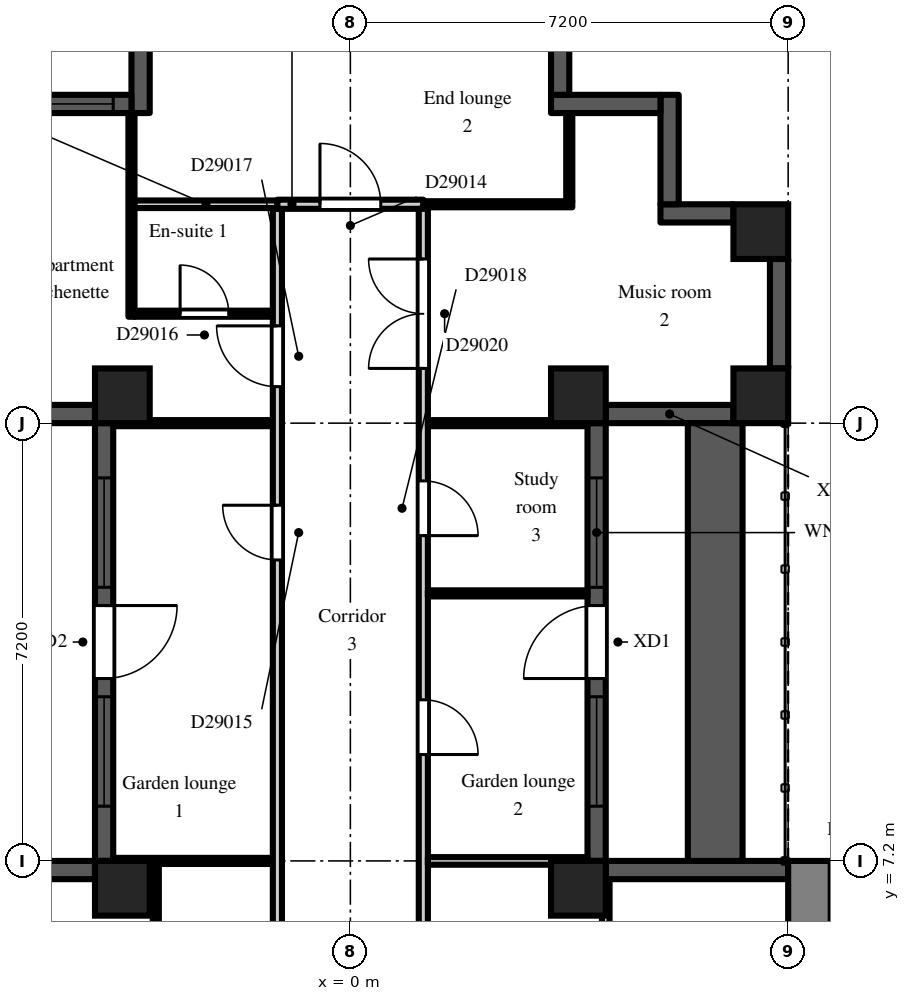
"""IFC4 building model, lengths in metres.
Left out: names, types, materials, properties, quantities, classifications, styles, units other than length and angle.
Written with IfcOpenShell. Run it as: python <this file> out.ifc"""

import sys

from ifc_helpers import new_model, si_unit, direction, frame, frame_2d, origin, origin_2d, place, context, subcontext, project, spatial, rectangle, extrude, element, fill, save


model = new_model("IFC4")
c1 = context("Model", 3, precision=1e-05, world=origin(), true_north=direction((0.0, 1.0)))
c2 = subcontext(c1, "Body", "Model", "MODEL_VIEW")
j1 = project(units=[si_unit("LENGTHUNIT", "METRE"), si_unit("PLANEANGLEUNIT", "RADIAN")], contexts=[c1])
p1 = place(None, origin())
s1 = spatial("IfcSite", under=j1, at=p1, CompositionType="ELEMENT")
p2 = place(p1, origin())
s2 = spatial("IfcBuilding", under=s1, at=p2, CompositionType="ELEMENT")
p3 = place(p2, frame((0.0, 0.0, 198.9)))
s3 = spatial("IfcBuildingStorey", under=s2, at=p3, CompositionType="ELEMENT", Elevation=198.9)
for number, where, z_axis, x_axis in (
    (1, (-3.75, 6.75, 0.0), (0.0, 0.0, 1.0), (1.0, 0.0, 0.0)),
    (2, (-3.75, 14.85, 0.0), (0.0, 0.0, 1.0), (1.0, 0.0, 0.0)),
    (3, (3.75, 6.75, 0.0), (0.0, 0.0, 1.0), (1.0, 0.0, 0.0)),
    (4, (3.75, 14.85, 0.0), (0.0, 0.0, 1.0), (1.0, 0.0, 0.0)),
    (5, (6.75, 14.85, 0.0), (0.0, 0.0, 1.0), (1.0, 0.0, 0.0)),
    (6, (6.75, 17.55, 0.0), (0.0, 0.0, 1.0), (1.0, 0.0, 0.0)),
):
    element("IfcColumn", number, at=place(p3, frame(where, z_axis=z_axis, x_axis=x_axis)), inside=s3, PredefinedType="COLUMN", context=c2, shape_type="SweptSolid", body=[
        extrude(rectangle(XDim=0.9, YDim=0.9, at=origin_2d()), origin(), (0.0, 0.0, 1.0), 3.0),
    ])
p4 = place(p3, frame((7.2, 7.05, 0.0), z_axis=(0.0, 0.0, 1.0), x_axis=(-1.0, 0.0, 0.0)))
e7 = element("IfcWall", 7, at=p4, inside=s3, PredefinedType="SOLIDWALL", context=c2, shape_type="SweptSolid", body=[
    extrude(rectangle(XDim=3.0, YDim=0.3, at=frame_2d((1.5, 0.0))), origin(), (0.0, 0.0, 1.0), 2.3),
])
p5 = place(p3, frame((4.05, 7.2, 0.0), z_axis=(0.0, 0.0, 1.0), x_axis=(0.0, 1.0, 0.0)))
e8 = element("IfcWall", 8, at=p5, inside=s3, PredefinedType="SOLIDWALL", context=c2, shape_type="SweptSolid", body=[
    extrude(rectangle(XDim=7.2, YDim=0.3, at=frame_2d((3.6, 0.0))), origin(), (0.0, 0.0, 1.0), 2.3),
])
p6 = place(p5, frame((3.0, 0.0, 0.0)))
e9 = element("IfcOpeningElement", 9, at=p6, cuts=e8, PredefinedType="OPENING", context=c2, shape_type="SweptSolid", body=[
    extrude(rectangle(XDim=1.2, YDim=2.05, at=frame_2d((0.6, 1.025))), frame((0.0, 0.16, 0.0), z_axis=(0.0, -1.0, 0.0), x_axis=(1.0, 0.0, 0.0)), (0.0, 0.0, 1.0), 0.32),
])
p7 = place(p5, frame((0.9, 0.0, 0.2)))
e10 = element("IfcOpeningElement", 10, at=p7, cuts=e8, PredefinedType="OPENING", context=c2, shape_type="SweptSolid", body=[
    extrude(rectangle(XDim=1.8, YDim=1.85, at=frame_2d((0.9, 0.925))), frame((0.0, 0.16, 0.0), z_axis=(0.0, -1.0, 0.0), x_axis=(1.0, 0.0, 0.0)), (0.0, 0.0, 1.0), 0.32),
])
p8 = place(p5, frame((4.5, 0.0, 0.2)))
e11 = element("IfcOpeningElement", 11, at=p8, cuts=e8, PredefinedType="OPENING", context=c2, shape_type="SweptSolid", body=[
    extrude(rectangle(XDim=1.8, YDim=1.85, at=frame_2d((0.9, 0.925))), frame((0.0, 0.16, 0.0), z_axis=(0.0, -1.0, 0.0), x_axis=(1.0, 0.0, 0.0)), (0.0, 0.0, 1.0), 0.32),
])
p9 = place(p3, frame((4.2, 14.55, 0.0), z_axis=(0.0, 0.0, 1.0), x_axis=(1.0, 0.0, 0.0)))
e12 = element("IfcWall", 12, at=p9, inside=s3, PredefinedType="SOLIDWALL", context=c2, shape_type="SweptSolid", body=[
    extrude(rectangle(XDim=2.1, YDim=0.3, at=frame_2d((1.05, 0.0))), origin(), (0.0, 0.0, 1.0), 2.3),
])
p10 = place(p3, frame((7.05, 15.3, 0.0), z_axis=(0.0, 0.0, 1.0), x_axis=(0.0, 1.0, 0.0)))
e13 = element("IfcWall", 13, at=p10, inside=s3, PredefinedType="SOLIDWALL", context=c2, shape_type="SweptSolid", body=[
    extrude(rectangle(XDim=1.8, YDim=0.3, at=frame_2d((0.9, 0.0))), origin(), (0.0, 0.0, 1.0), 2.3),
])
p11 = place(p3, frame((6.3, 17.85, 0.0), z_axis=(0.0, 0.0, 1.0), x_axis=(-1.0, 0.0, 0.0)))
e14 = element("IfcWall", 14, at=p11, inside=s3, PredefinedType="SOLIDWALL", context=c2, shape_type="SweptSolid", body=[
    extrude(rectangle(XDim=1.2, YDim=0.3, at=frame_2d((0.6, 0.0))), origin(), (0.0, 0.0, 1.0), 2.6),
])
for number, where, z_axis, x_axis in (
    (15, (5.25, 18.0, 0.0), (0.0, 0.0, 1.0), (0.0, 1.0, 0.0)),
    (16, (5.1, 19.65, 0.0), (0.0, 0.0, 1.0), (-1.0, 0.0, 0.0)),
):
    element("IfcWall", number, at=place(p3, frame(where, z_axis=z_axis, x_axis=x_axis)), inside=s3, PredefinedType="SOLIDWALL", context=c2, shape_type="SweptSolid", body=[
        extrude(rectangle(XDim=1.8, YDim=0.3, at=frame_2d((0.9, 0.0))), origin(), (0.0, 0.0, 1.0), 2.6),
    ])
p12 = place(p3, frame((3.45, 19.8, 0.0), z_axis=(0.0, 0.0, 1.0), x_axis=(0.0, 1.0, 0.0)))
e17 = element("IfcWall", 17, at=p12, inside=s3, PredefinedType="SOLIDWALL", context=c2, shape_type="SweptSolid", body=[
    extrude(rectangle(XDim=0.9, YDim=0.3, at=frame_2d((0.45, 0.0))), origin(), (0.0, 0.0, 1.0), 2.6),
])
p13 = place(p3, frame((-3.45, 20.7, 0.0), z_axis=(0.0, 0.0, 1.0), x_axis=(0.0, -1.0, 0.0)))
e18 = element("IfcWall", 18, at=p13, inside=s3, PredefinedType="SOLIDWALL", context=c2, shape_type="SweptSolid", body=[
    extrude(rectangle(XDim=1.2, YDim=0.3, at=frame_2d((0.6, 0.0))), origin(), (0.0, 0.0, 1.0), 2.6),
])
p14 = place(p3, frame((-3.6, 19.65, 0.0), z_axis=(0.0, 0.0, 1.0), x_axis=(-1.0, 0.0, 0.0)))
e19 = element("IfcWall", 19, at=p14, inside=s3, PredefinedType="SOLIDWALL", context=c2, shape_type="SweptSolid", body=[
    extrude(rectangle(XDim=1.8, YDim=0.3, at=frame_2d((0.9, 0.0))), origin(), (0.0, 0.0, 1.0), 2.6),
])
p15 = place(p14, frame((0.3, 0.0, 0.2)))
e20 = element("IfcOpeningElement", 20, at=p15, cuts=e19, PredefinedType="OPENING", context=c2, shape_type="SweptSolid", body=[
    extrude(rectangle(XDim=1.2, YDim=1.85, at=frame_2d((0.6, 0.925))), frame((0.0, 0.16, 0.0), z_axis=(0.0, -1.0, 0.0), x_axis=(1.0, 0.0, 0.0)), (0.0, 0.0, 1.0), 0.32),
])
p16 = place(p3, frame((-6.3, 14.55, 0.0), z_axis=(0.0, 0.0, 1.0), x_axis=(1.0, 0.0, 0.0)))
e21 = element("IfcWall", 21, at=p16, inside=s3, PredefinedType="SOLIDWALL", context=c2, shape_type="SweptSolid", body=[
    extrude(rectangle(XDim=2.1, YDim=0.3, at=frame_2d((1.05, 0.0))), origin(), (0.0, 0.0, 1.0), 2.3),
])
p17 = place(p3, frame((-4.05, 14.4, 0.0), z_axis=(0.0, 0.0, 1.0), x_axis=(0.0, -1.0, 0.0)))
e22 = element("IfcWall", 22, at=p17, inside=s3, PredefinedType="SOLIDWALL", context=c2, shape_type="SweptSolid", body=[
    extrude(rectangle(XDim=7.2, YDim=0.3, at=frame_2d((3.6, 0.0))), origin(), (0.0, 0.0, 1.0), 2.3),
])
p18 = place(p17, frame((3.0, 0.0, 0.0)))
e23 = element("IfcOpeningElement", 23, at=p18, cuts=e22, PredefinedType="OPENING", context=c2, shape_type="SweptSolid", body=[
    extrude(rectangle(XDim=1.2, YDim=2.05, at=frame_2d((0.6, 1.025))), frame((0.0, 0.16, 0.0), z_axis=(0.0, -1.0, 0.0), x_axis=(1.0, 0.0, 0.0)), (0.0, 0.0, 1.0), 0.32),
])
p19 = place(p17, frame((0.9, 0.0, 0.2)))
e24 = element("IfcOpeningElement", 24, at=p19, cuts=e22, PredefinedType="OPENING", context=c2, shape_type="SweptSolid", body=[
    extrude(rectangle(XDim=1.8, YDim=1.85, at=frame_2d((0.9, 0.925))), frame((0.0, 0.16, 0.0), z_axis=(0.0, -1.0, 0.0), x_axis=(1.0, 0.0, 0.0)), (0.0, 0.0, 1.0), 0.32),
])
p20 = place(p17, frame((4.5, 0.0, 0.2)))
e25 = element("IfcOpeningElement", 25, at=p20, cuts=e22, PredefinedType="OPENING", context=c2, shape_type="SweptSolid", body=[
    extrude(rectangle(XDim=1.8, YDim=1.85, at=frame_2d((0.9, 0.925))), frame((0.0, 0.16, 0.0), z_axis=(0.0, -1.0, 0.0), x_axis=(1.0, 0.0, 0.0)), (0.0, 0.0, 1.0), 0.32),
])
p21 = place(p3, frame((-4.2, 7.05, 0.0), z_axis=(0.0, 0.0, 1.0), x_axis=(-1.0, 0.0, 0.0)))
e26 = element("IfcWall", 26, at=p21, inside=s3, PredefinedType="SOLIDWALL", context=c2, shape_type="SweptSolid", body=[
    extrude(rectangle(XDim=3.0, YDim=0.3, at=frame_2d((1.5, 0.0))), origin(), (0.0, 0.0, 1.0), 2.3),
])
p22 = place(p3, frame((6.0, 7.2, 0.0), z_axis=(0.0, 0.0, 1.0), x_axis=(0.0, 1.0, 0.0)))
e27 = element("IfcWall", 27, at=p22, inside=s3, PredefinedType="PARAPET", context=c2, shape_type="SweptSolid", body=[
    extrude(rectangle(XDim=7.2, YDim=0.9, at=frame_2d((3.6, 0.0))), origin(), (0.0, 0.0, 1.0), 0.8),
])
p23 = place(p3, frame((7.55, -7.2, 0.0), z_axis=(0.0, 0.0, 1.0), x_axis=(0.0, 1.0, 0.0)))
e28 = element("IfcWall", 28, at=p23, inside=s3, PredefinedType="SHEAR", context=c2, shape_type="SweptSolid", body=[
    extrude(rectangle(XDim=14.4, YDim=0.7, at=frame_2d((7.2, 0.0))), origin(), (0.0, 0.0, 1.0), 2.6),
])
p24 = place(p23, frame((6.0, 0.0, 0.0)))
e29 = element("IfcOpeningElement", 29, at=p24, cuts=e28, PredefinedType="OPENING", context=c2, shape_type="SweptSolid", body=[
    extrude(rectangle(XDim=2.4, YDim=2.2, at=frame_2d((1.2, 1.1))), frame((0.0, 0.36, 0.0), z_axis=(0.0, -1.0, 0.0), x_axis=(1.0, 0.0, 0.0)), (0.0, 0.0, 1.0), 0.72),
])
for number, where, z_axis, x_axis in (
    (30, (-3.9, 7.2, 0.0), (0.0, 0.0, 1.0), (1.0, 0.0, 0.0)),
    (31, (-3.9, 14.4, 0.0), (0.0, 0.0, 1.0), (1.0, 0.0, 0.0)),
):
    element("IfcWall", number, at=place(p3, frame(where, z_axis=z_axis, x_axis=x_axis)), inside=s3, PredefinedType="PARTITIONING", context=c2, shape_type="SweptSolid", body=[
        extrude(rectangle(XDim=2.625, YDim=0.1, at=frame_2d((1.312, 0.0))), origin(), (0.0, 0.0, 1.0), 2.6),
    ])
p25 = place(p3, frame((-3.6, 16.15, 0.0), z_axis=(0.0, 0.0, 1.0), x_axis=(0.0, 1.0, 0.0)))
e32 = element("IfcWall", 32, at=p25, inside=s3, PredefinedType="PARTITIONING", context=c2, shape_type="SweptSolid", body=[
    extrude(rectangle(XDim=3.35, YDim=0.1, at=frame_2d((1.675, 0.0))), origin(), (0.0, 0.0, 1.0), 2.6),
])
p26 = place(p3, frame((-3.55, 16.2, 0.0), z_axis=(0.0, 0.0, 1.0), x_axis=(1.0, 0.0, 0.0)))
e33 = element("IfcWall", 33, at=p26, inside=s3, PredefinedType="PARTITIONING", context=c2, shape_type="SweptSolid", body=[
    extrude(rectangle(XDim=2.275, YDim=0.1, at=frame_2d((1.138, 0.0))), origin(), (0.0, 0.0, 1.0), 2.6),
])
p27 = place(p26, frame((0.75, 0.0, 0.0)))
e34 = element("IfcOpeningElement", 34, at=p27, cuts=e33, PredefinedType="OPENING", context=c2, shape_type="SweptSolid", body=[
    extrude(rectangle(XDim=0.8, YDim=2.1, at=frame_2d((0.4, 1.05))), frame((0.0, 0.06, 0.0), z_axis=(0.0, -1.0, 0.0), x_axis=(1.0, 0.0, 0.0)), (0.0, 0.0, 1.0), 0.12),
])
p28 = place(p3, frame((-3.55, 18.0, 0.0), z_axis=(0.0, 0.0, 1.0), x_axis=(1.0, 0.0, 0.0)))
e35 = element("IfcWall", 35, at=p28, inside=s3, PredefinedType="PARTITIONING", context=c2, shape_type="SweptSolid", body=[
    extrude(rectangle(XDim=2.35, YDim=0.125, at=frame_2d((1.175, 0.0))), origin(), (0.0, 0.0, 1.0), 2.6),
])
p29 = place(p3, frame((-3.2, 1.275, 0.0), z_axis=(0.0, 0.0, 1.0), x_axis=(0.0, 1.0, 0.0)))
e36 = element("IfcWall", 36, at=p29, inside=s3, PredefinedType="PARTITIONING", context=c2, shape_type="SweptSolid", body=[
    extrude(rectangle(XDim=5.875, YDim=0.1, at=frame_2d((2.938, 0.0))), origin(), (0.0, 0.0, 1.0), 2.6),
])
p30 = place(p3, frame((-1.2, 1.275, 0.0), z_axis=(0.0, 0.0, 1.0), x_axis=(0.0, 1.0, 0.0)))
e37 = element("IfcWall", 37, at=p30, inside=s3, PredefinedType="PARTITIONING", context=c2, shape_type="SweptSolid", body=[
    extrude(rectangle(XDim=16.65, YDim=0.15, at=frame_2d((8.325, 0.0))), origin(), (0.0, 0.0, 1.0), 2.6),
])
p31 = place(p30, frame((2.475, 0.0, 0.0)))
e38 = element("IfcOpeningElement", 38, at=p31, cuts=e37, PredefinedType="OPENING", context=c2, shape_type="SweptSolid", body=[
    extrude(rectangle(XDim=0.9, YDim=2.1, at=frame_2d((0.45, 1.05))), frame((0.0, 0.085, 0.0), z_axis=(0.0, -1.0, 0.0), x_axis=(1.0, 0.0, 0.0)), (0.0, 0.0, 1.0), 0.17),
])
p32 = place(p30, frame((10.875, 0.0, 0.0)))
e39 = element("IfcOpeningElement", 39, at=p32, cuts=e37, PredefinedType="OPENING", context=c2, shape_type="SweptSolid", body=[
    extrude(rectangle(XDim=0.9, YDim=2.1, at=frame_2d((0.45, 1.05))), frame((0.0, 0.085, 0.0), z_axis=(0.0, -1.0, 0.0), x_axis=(1.0, 0.0, 0.0)), (0.0, 0.0, 1.0), 0.17),
])
p33 = place(p30, frame((13.725, 0.0, 0.0)))
e40 = element("IfcOpeningElement", 40, at=p33, cuts=e37, PredefinedType="OPENING", context=c2, shape_type="SweptSolid", body=[
    extrude(rectangle(XDim=1.0, YDim=2.1, at=frame_2d((0.5, 1.05))), frame((0.0, 0.085, 0.0), z_axis=(0.0, -1.0, 0.0), x_axis=(1.0, 0.0, 0.0)), (0.0, 0.0, 1.0), 0.17),
])
p34 = place(p3, frame((-1.2, 18.0, 0.0), z_axis=(0.0, 0.0, 1.0), x_axis=(1.0, 0.0, 0.0)))
e41 = element("IfcWall", 41, at=p34, inside=s3, PredefinedType="PARTITIONING", context=c2, shape_type="SweptSolid", body=[
    extrude(rectangle(XDim=2.4, YDim=0.15, at=frame_2d((1.2, 0.0))), origin(), (0.0, 0.0, 1.0), 2.6),
])
p35 = place(p34, frame((0.7, 0.0, 0.0)))
e42 = element("IfcOpeningElement", 42, at=p35, cuts=e41, PredefinedType="OPENING", context=c2, shape_type="SweptSolid", body=[
    extrude(rectangle(XDim=1.0, YDim=2.1, at=frame_2d((0.5, 1.05))), frame((0.0, 0.085, 0.0), z_axis=(0.0, -1.0, 0.0), x_axis=(1.0, 0.0, 0.0)), (0.0, 0.0, 1.0), 0.17),
])
p36 = place(p3, frame((1.2, 1.125, 0.0), z_axis=(0.0, 0.0, 1.0), x_axis=(0.0, 1.0, 0.0)))
e43 = element("IfcWall", 43, at=p36, inside=s3, PredefinedType="PARTITIONING", context=c2, shape_type="SweptSolid", body=[
    extrude(rectangle(XDim=16.8, YDim=0.15, at=frame_2d((8.4, 0.0))), origin(), (0.0, 0.0, 1.0), 2.6),
])
p37 = place(p36, frame((2.625, 0.0, 0.0)))
e44 = element("IfcOpeningElement", 44, at=p37, cuts=e43, PredefinedType="OPENING", context=c2, shape_type="SweptSolid", body=[
    extrude(rectangle(XDim=0.9, YDim=2.1, at=frame_2d((0.45, 1.05))), frame((0.0, 0.085, 0.0), z_axis=(0.0, -1.0, 0.0), x_axis=(1.0, 0.0, 0.0)), (0.0, 0.0, 1.0), 0.17),
])
p38 = place(p36, frame((11.425, 0.0, 0.0)))
e45 = element("IfcOpeningElement", 45, at=p38, cuts=e43, PredefinedType="OPENING", context=c2, shape_type="SweptSolid", body=[
    extrude(rectangle(XDim=0.9, YDim=2.1, at=frame_2d((0.45, 1.05))), frame((0.0, 0.085, 0.0), z_axis=(0.0, -1.0, 0.0), x_axis=(1.0, 0.0, 0.0)), (0.0, 0.0, 1.0), 0.17),
])
p39 = place(p36, frame((7.825, 0.0, 0.0)))
e46 = element("IfcOpeningElement", 46, at=p39, cuts=e43, PredefinedType="OPENING", context=c2, shape_type="SweptSolid", body=[
    extrude(rectangle(XDim=0.9, YDim=2.1, at=frame_2d((0.45, 1.05))), frame((0.0, 0.085, 0.0), z_axis=(0.0, -1.0, 0.0), x_axis=(1.0, 0.0, 0.0)), (0.0, 0.0, 1.0), 0.17),
])
p40 = place(p36, frame((14.175, 0.0, 0.0)))
e47 = element("IfcOpeningElement", 47, at=p40, cuts=e43, PredefinedType="OPENING", context=c2, shape_type="SweptSolid", body=[
    extrude(rectangle(XDim=1.8, YDim=2.1, at=frame_2d((0.9, 1.05))), frame((0.0, 0.085, 0.0), z_axis=(0.0, -1.0, 0.0), x_axis=(1.0, 0.0, 0.0)), (0.0, 0.0, 1.0), 0.17),
])
p41 = place(p3, frame((1.275, 7.2, 0.0), z_axis=(0.0, 0.0, 1.0), x_axis=(1.0, 0.0, 0.0)))
e48 = element("IfcWall", 48, at=p41, inside=s3, PredefinedType="PARTITIONING", context=c2, shape_type="SweptSolid", body=[
    extrude(rectangle(XDim=2.625, YDim=0.125, at=frame_2d((1.312, 0.0))), origin(), (0.0, 0.0, 1.0), 2.6),
])
for number, where, z_axis, x_axis in (
    (49, (1.275, 11.6, 0.0), (0.0, 0.0, 1.0), (1.0, 0.0, 0.0)),
    (50, (1.275, 14.4, 0.0), (0.0, 0.0, 1.0), (1.0, 0.0, 0.0)),
):
    element("IfcWall", number, at=place(p3, frame(where, z_axis=z_axis, x_axis=x_axis)), inside=s3, PredefinedType="PARTITIONING", context=c2, shape_type="SweptSolid", body=[
        extrude(rectangle(XDim=2.625, YDim=0.1, at=frame_2d((1.312, 0.0))), origin(), (0.0, 0.0, 1.0), 2.6),
    ])
p42 = place(p3, frame((1.2, 18.0, 0.0), z_axis=(0.0, 0.0, 1.0), x_axis=(1.0, 0.0, 0.0)))
e51 = element("IfcWall", 51, at=p42, inside=s3, PredefinedType="PARTITIONING", context=c2, shape_type="SweptSolid", body=[
    extrude(rectangle(XDim=2.45, YDim=0.1, at=frame_2d((1.225, 0.0))), origin(), (0.0, 0.0, 1.0), 2.6),
])
p43 = place(p3, frame((3.6, 18.05, 0.0), z_axis=(0.0, 0.0, 1.0), x_axis=(0.0, 1.0, 0.0)))
e52 = element("IfcWall", 52, at=p43, inside=s3, PredefinedType="PARTITIONING", context=c2, shape_type="SweptSolid", body=[
    extrude(rectangle(XDim=1.45, YDim=0.1, at=frame_2d((0.725, 0.0))), origin(), (0.0, 0.0, 1.0), 2.6),
])
p44 = place(p3, frame((4.2, 1.275, 0.0), z_axis=(0.0, 0.0, 1.0), x_axis=(0.0, 1.0, 0.0)))
e53 = element("IfcWall", 53, at=p44, inside=s3, PredefinedType="PARTITIONING", context=c2, shape_type="SweptSolid", body=[
    extrude(rectangle(XDim=5.625, YDim=0.125, at=frame_2d((2.812, 0.0))), origin(), (0.0, 0.0, 1.0), 2.6),
])
p45 = place(p6, origin())
e54 = element("IfcDoor", 54, at=p45, inside=s3, OperationType="SINGLE_SWING_LEFT", PredefinedType="DOOR", context=c2, shape_type="SweptSolid", body=[
    extrude(rectangle(XDim=1.2, YDim=2.05, at=frame_2d((0.6, 1.025))), frame((0.0, 0.025, 0.0), z_axis=(0.0, -1.0, 0.0), x_axis=(1.0, 0.0, 0.0)), (0.0, 0.0, 1.0), 0.05),
])
fill(e9, e54)
p46 = place(p7, origin())
e55 = element("IfcWindow", 55, at=p46, inside=s3, PartitioningType="SINGLE_PANEL", PredefinedType="WINDOW", context=c2, shape_type="SweptSolid", body=[
    extrude(rectangle(XDim=1.8, YDim=1.85, at=frame_2d((0.9, 0.925))), frame((0.0, 0.03, 0.0), z_axis=(0.0, -1.0, 0.0), x_axis=(1.0, 0.0, 0.0)), (0.0, 0.0, 1.0), 0.06),
])
fill(e10, e55)
p47 = place(p8, origin())
e56 = element("IfcWindow", 56, at=p47, inside=s3, PartitioningType="SINGLE_PANEL", PredefinedType="WINDOW", context=c2, shape_type="SweptSolid", body=[
    extrude(rectangle(XDim=1.8, YDim=1.85, at=frame_2d((0.9, 0.925))), frame((0.0, 0.03, 0.0), z_axis=(0.0, -1.0, 0.0), x_axis=(1.0, 0.0, 0.0)), (0.0, 0.0, 1.0), 0.06),
])
fill(e11, e56)
p48 = place(p15, origin())
e57 = element("IfcWindow", 57, at=p48, inside=s3, PartitioningType="SINGLE_PANEL", PredefinedType="WINDOW", context=c2, shape_type="SweptSolid", body=[
    extrude(rectangle(XDim=1.2, YDim=1.85, at=frame_2d((0.6, 0.925))), frame((0.0, 0.03, 0.0), z_axis=(0.0, -1.0, 0.0), x_axis=(1.0, 0.0, 0.0)), (0.0, 0.0, 1.0), 0.06),
])
fill(e20, e57)
p49 = place(p18, origin())
e58 = element("IfcDoor", 58, at=p49, inside=s3, OperationType="SINGLE_SWING_LEFT", PredefinedType="DOOR", context=c2, shape_type="SweptSolid", body=[
    extrude(rectangle(XDim=1.2, YDim=2.05, at=frame_2d((0.6, 1.025))), frame((0.0, 0.025, 0.0), z_axis=(0.0, -1.0, 0.0), x_axis=(1.0, 0.0, 0.0)), (0.0, 0.0, 1.0), 0.05),
])
fill(e23, e58)
p50 = place(p19, origin())
e59 = element("IfcWindow", 59, at=p50, inside=s3, PartitioningType="SINGLE_PANEL", PredefinedType="WINDOW", context=c2, shape_type="SweptSolid", body=[
    extrude(rectangle(XDim=1.8, YDim=1.85, at=frame_2d((0.9, 0.925))), frame((0.0, 0.03, 0.0), z_axis=(0.0, -1.0, 0.0), x_axis=(1.0, 0.0, 0.0)), (0.0, 0.0, 1.0), 0.06),
])
fill(e24, e59)
p51 = place(p20, origin())
e60 = element("IfcWindow", 60, at=p51, inside=s3, PartitioningType="SINGLE_PANEL", PredefinedType="WINDOW", context=c2, shape_type="SweptSolid", body=[
    extrude(rectangle(XDim=1.8, YDim=1.85, at=frame_2d((0.9, 0.925))), frame((0.0, 0.03, 0.0), z_axis=(0.0, -1.0, 0.0), x_axis=(1.0, 0.0, 0.0)), (0.0, 0.0, 1.0), 0.06),
])
fill(e25, e60)
p52 = place(p35, origin())
e61 = element("IfcDoor", 61, at=p52, inside=s3, OperationType="SINGLE_SWING_LEFT", PredefinedType="DOOR", context=c2, shape_type="SweptSolid", body=[
    extrude(rectangle(XDim=1.0, YDim=2.1, at=frame_2d((0.5, 1.05))), frame((0.0, 0.025, 0.0), z_axis=(0.0, -1.0, 0.0), x_axis=(1.0, 0.0, 0.0)), (0.0, 0.0, 1.0), 0.05),
])
fill(e42, e61)
p53 = place(p32, origin())
e62 = element("IfcDoor", 62, at=p53, inside=s3, OperationType="SINGLE_SWING_RIGHT", PredefinedType="DOOR", context=c2, shape_type="SweptSolid", body=[
    extrude(rectangle(XDim=0.9, YDim=2.1, at=frame_2d((0.45, 1.05))), frame((0.0, 0.025, 0.0), z_axis=(0.0, -1.0, 0.0), x_axis=(1.0, 0.0, 0.0)), (0.0, 0.0, 1.0), 0.05),
])
fill(e39, e62)
p54 = place(p27, origin())
e63 = element("IfcDoor", 63, at=p54, inside=s3, OperationType="SINGLE_SWING_LEFT", PredefinedType="DOOR", context=c2, shape_type="SweptSolid", body=[
    extrude(rectangle(XDim=0.8, YDim=2.1, at=frame_2d((0.4, 1.05))), frame((0.0, 0.025, 0.0), z_axis=(0.0, -1.0, 0.0), x_axis=(1.0, 0.0, 0.0)), (0.0, 0.0, 1.0), 0.05),
])
fill(e34, e63)
p55 = place(p33, origin())
e64 = element("IfcDoor", 64, at=p55, inside=s3, OperationType="SINGLE_SWING_RIGHT", PredefinedType="DOOR", context=c2, shape_type="SweptSolid", body=[
    extrude(rectangle(XDim=1.0, YDim=2.1, at=frame_2d((0.5, 1.05))), frame((0.0, 0.025, 0.0), z_axis=(0.0, -1.0, 0.0), x_axis=(1.0, 0.0, 0.0)), (0.0, 0.0, 1.0), 0.05),
])
fill(e40, e64)
p56 = place(p38, frame((0.9, 0.0, 0.0), z_axis=(0.0, 0.0, 1.0), x_axis=(-1.0, 0.0, 0.0)))
e65 = element("IfcDoor", 65, at=p56, inside=s3, OperationType="SINGLE_SWING_RIGHT", PredefinedType="DOOR", context=c2, shape_type="SweptSolid", body=[
    extrude(rectangle(XDim=0.9, YDim=2.1, at=frame_2d((0.45, 1.05))), frame((0.0, 0.025, 0.0), z_axis=(0.0, -1.0, 0.0), x_axis=(1.0, 0.0, 0.0)), (0.0, 0.0, 1.0), 0.05),
])
fill(e45, e65)
p57 = place(p39, frame((0.9, 0.0, 0.0), z_axis=(0.0, 0.0, 1.0), x_axis=(-1.0, 0.0, 0.0)))
e66 = element("IfcDoor", 66, at=p57, inside=s3, OperationType="SINGLE_SWING_RIGHT", PredefinedType="DOOR", context=c2, shape_type="SweptSolid", body=[
    extrude(rectangle(XDim=0.9, YDim=2.1, at=frame_2d((0.45, 1.05))), frame((0.0, 0.025, 0.0), z_axis=(0.0, -1.0, 0.0), x_axis=(1.0, 0.0, 0.0)), (0.0, 0.0, 1.0), 0.05),
])
fill(e46, e66)
p58 = place(p40, origin())
e67 = element("IfcDoor", 67, at=p58, inside=s3, OperationType="DOUBLE_DOOR_DOUBLE_SWING", PredefinedType="DOOR", context=c2, shape_type="SweptSolid", body=[
    extrude(rectangle(XDim=1.8, YDim=2.1, at=frame_2d((0.9, 1.05))), frame((0.0, 0.025, 0.0), z_axis=(0.0, -1.0, 0.0), x_axis=(1.0, 0.0, 0.0)), (0.0, 0.0, 1.0), 0.05),
])
fill(e47, e67)
save(model, sys.argv[1])
